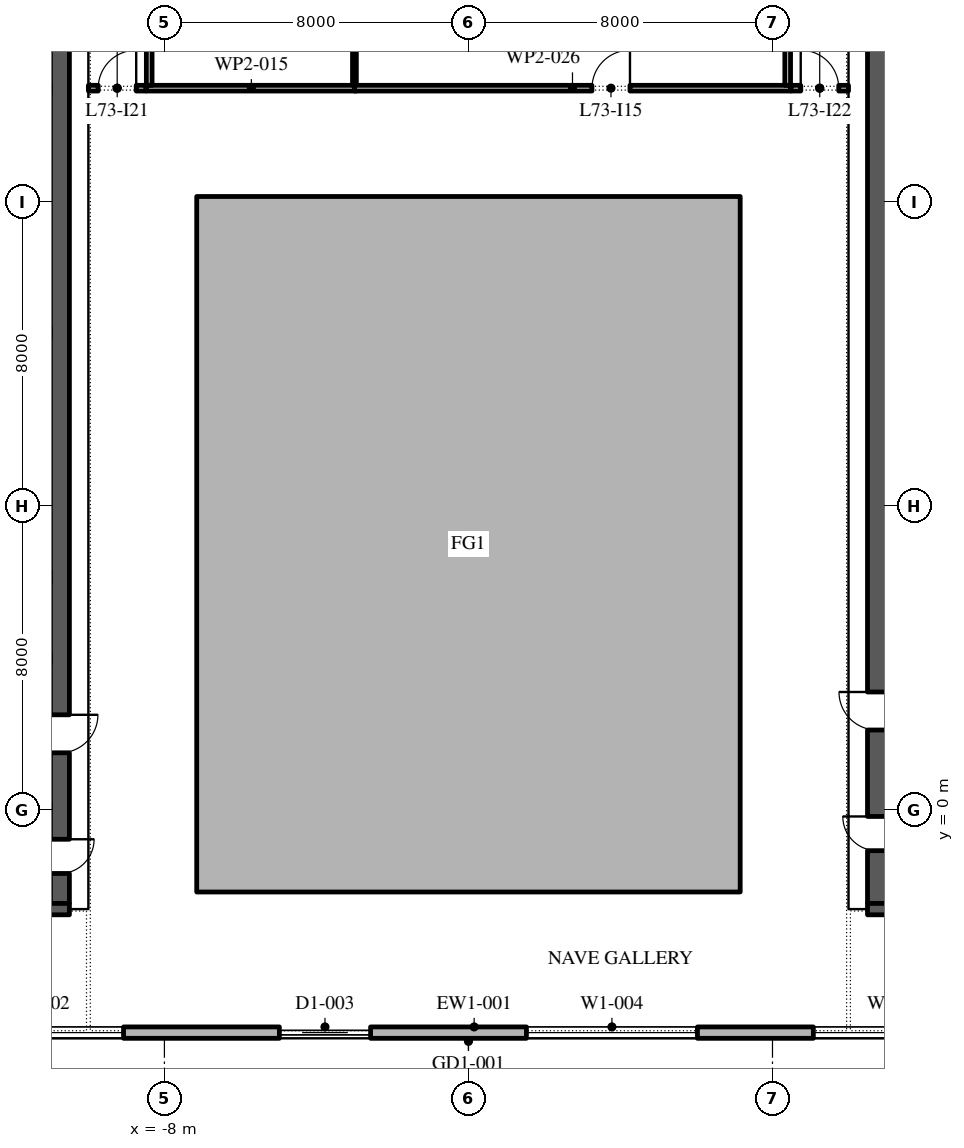
"""IFC4 building model, lengths in metres.
Left out: names, types, materials, properties, quantities, classifications, styles, units other than length and angle.
Written with IfcOpenShell. Run it as: python <this file> out.ifc"""

import sys

from ifc_helpers import new_model, si_unit, direction, frame, frame_2d, origin, place, context, subcontext, project, spatial, polyline, rectangle, outline, extrude, element, fill, save


model = new_model("IFC4")
c1 = context("Model", 3, precision=1e-05, world=origin(), true_north=direction((0.0, 1.0)))
c2 = subcontext(c1, "Body", "Model", "MODEL_VIEW")
j1 = project(units=[si_unit("LENGTHUNIT", "METRE"), si_unit("PLANEANGLEUNIT", "RADIAN")], contexts=[c1])
p1 = place(None, origin())
s1 = spatial("IfcSite", under=j1, at=p1, CompositionType="ELEMENT")
p2 = place(p1, origin())
s2 = spatial("IfcBuilding", under=s1, at=p2, CompositionType="ELEMENT")
p3 = place(p2, frame((0.0, 0.0, 334.2)))
s3 = spatial("IfcBuildingStorey", under=s2, at=p3, CompositionType="ELEMENT", Elevation=334.2)
p4 = place(p3, origin())
e1 = element("IfcWall", 1, at=p4, inside=s3, PredefinedType="STANDARD", context=c2, shape_type="SweptSolid", body=[
    extrude(outline(polyline([(-7.15, -2.15), (7.15, -2.15), (7.15, 16.15), (-7.15, 16.15), (-7.15, -2.15)]), holes=[polyline([(-7.0, -2.0), (-7.0, 16.0), (7.0, 16.0), (7.0, -2.0), (-7.0, -2.0)])]), origin(), (0.0, 0.0, 1.0), 4.0),
])
p5 = place(p3, frame((-22.35, -5.85, 0.0), z_axis=(0.0, 0.0, 1.0), x_axis=(1.0, 0.0, 0.0)))
e2 = element("IfcWall", 2, at=p5, inside=s3, PredefinedType="STANDARD", context=c2, shape_type="SweptSolid", body=[
    extrude(rectangle(XDim=45.0, YDim=0.3, at=frame_2d((22.5, 0.0))), origin(), (0.0, 0.0, 1.0), 4.0),
])
p6 = place(p5, frame((1.375, 0.0, 0.45)))
e3 = element("IfcOpeningElement", 3, at=p6, cuts=e2, PredefinedType="OPENING", context=c2, shape_type="SweptSolid", body=[
    extrude(rectangle(XDim=4.5, YDim=3.05, at=frame_2d((2.25, 1.525))), frame((0.0, 0.16, 0.0), z_axis=(0.0, -1.0, 0.0), x_axis=(1.0, 0.0, 0.0)), (0.0, 0.0, 1.0), 0.32),
])
p7 = place(p5, frame((8.775, 0.0, 0.45)))
e4 = element("IfcOpeningElement", 4, at=p7, cuts=e2, PredefinedType="OPENING", context=c2, shape_type="SweptSolid", body=[
    extrude(rectangle(XDim=4.5, YDim=3.05, at=frame_2d((2.25, 1.525))), frame((0.0, 0.16, 0.0), z_axis=(0.0, -1.0, 0.0), x_axis=(1.0, 0.0, 0.0)), (0.0, 0.0, 1.0), 0.32),
])
p8 = place(p5, frame((17.375, 0.0, 0.0)))
e5 = element("IfcOpeningElement", 5, at=p8, cuts=e2, PredefinedType="OPENING", context=c2, shape_type="SweptSolid", body=[
    extrude(rectangle(XDim=2.4, YDim=3.5, at=frame_2d((1.2, 1.75))), frame((0.0, 0.16, 0.0), z_axis=(0.0, -1.0, 0.0), x_axis=(1.0, 0.0, 0.0)), (0.0, 0.0, 1.0), 0.32),
])
p9 = place(p5, frame((23.875, 0.0, 0.45)))
e6 = element("IfcOpeningElement", 6, at=p9, cuts=e2, PredefinedType="OPENING", context=c2, shape_type="SweptSolid", body=[
    extrude(rectangle(XDim=4.5, YDim=3.05, at=frame_2d((2.25, 1.525))), frame((0.0, 0.16, 0.0), z_axis=(0.0, -1.0, 0.0), x_axis=(1.0, 0.0, 0.0)), (0.0, 0.0, 1.0), 0.32),
])
p10 = place(p5, frame((31.425, 0.0, 0.45)))
e7 = element("IfcOpeningElement", 7, at=p10, cuts=e2, PredefinedType="OPENING", context=c2, shape_type="SweptSolid", body=[
    extrude(rectangle(XDim=4.5, YDim=3.05, at=frame_2d((2.25, 1.525))), frame((0.0, 0.16, 0.0), z_axis=(0.0, -1.0, 0.0), x_axis=(1.0, 0.0, 0.0)), (0.0, 0.0, 1.0), 0.32),
])
p11 = place(p5, frame((38.975, 0.0, 0.45)))
e8 = element("IfcOpeningElement", 8, at=p11, cuts=e2, PredefinedType="OPENING", context=c2, shape_type="SweptSolid", body=[
    extrude(rectangle(XDim=4.5, YDim=3.05, at=frame_2d((2.25, 1.525))), frame((0.0, 0.16, 0.0), z_axis=(0.0, -1.0, 0.0), x_axis=(1.0, 0.0, 0.0)), (0.0, 0.0, 1.0), 0.32),
])
p12 = place(p3, frame((-10.75, -2.45, 0.0), z_axis=(0.0, 0.0, 1.0), x_axis=(0.0, 1.0, 0.0)))
e9 = element("IfcWall", 9, at=p12, inside=s3, PredefinedType="SHEAR", context=c2, shape_type="SweptSolid", body=[
    extrude(rectangle(XDim=27.9, YDim=0.5, at=frame_2d((13.95, 0.0))), origin(), (0.0, 0.0, 1.0), 4.0),
])
p13 = place(p12, frame((23.65, 0.0, 0.0)))
e10 = element("IfcOpeningElement", 10, at=p13, cuts=e9, PredefinedType="OPENING", context=c2, shape_type="SweptSolid", body=[
    extrude(rectangle(XDim=2.4, YDim=2.1, at=frame_2d((1.2, 1.05))), frame((0.0, 0.26, 0.0), z_axis=(0.0, -1.0, 0.0), x_axis=(1.0, 0.0, 0.0)), (0.0, 0.0, 1.0), 0.52),
])
p14 = place(p12, frame((0.788, 0.0, 0.0)))
e11 = element("IfcOpeningElement", 11, at=p14, cuts=e9, PredefinedType="OPENING", context=c2, shape_type="SweptSolid", body=[
    extrude(rectangle(XDim=0.9, YDim=2.1, at=frame_2d((0.45, 1.05))), frame((0.0, 0.26, 0.0), z_axis=(0.0, -1.0, 0.0), x_axis=(1.0, 0.0, 0.0)), (0.0, 0.0, 1.0), 0.52),
])
p15 = place(p12, frame((3.962, 0.0, 0.0)))
e12 = element("IfcOpeningElement", 12, at=p15, cuts=e9, PredefinedType="OPENING", context=c2, shape_type="SweptSolid", body=[
    extrude(rectangle(XDim=1.0, YDim=2.1, at=frame_2d((0.5, 1.05))), frame((0.0, 0.26, 0.0), z_axis=(0.0, -1.0, 0.0), x_axis=(1.0, 0.0, 0.0)), (0.0, 0.0, 1.0), 0.52),
])
p16 = place(p3, frame((-21.5, -2.6, 0.0), z_axis=(0.0, 0.0, 1.0), x_axis=(1.0, 0.0, 0.0)))
e13 = element("IfcWall", 13, at=p16, inside=s3, PredefinedType="SHEAR", context=c2, shape_type="SweptSolid", body=[
    extrude(rectangle(XDim=11.0, YDim=0.3, at=frame_2d((5.5, 0.0))), origin(), (0.0, 0.0, 1.0), 4.0),
])
p17 = place(p3, frame((10.75, -2.45, 0.0), z_axis=(0.0, 0.0, 1.0), x_axis=(0.0, 1.0, 0.0)))
e14 = element("IfcWall", 14, at=p17, inside=s3, PredefinedType="SHEAR", context=c2, shape_type="SweptSolid", body=[
    extrude(rectangle(XDim=27.9, YDim=0.5, at=frame_2d((13.95, 0.0))), origin(), (0.0, 0.0, 1.0), 4.0),
])
p18 = place(p17, frame((23.65, 0.0, 0.0)))
e15 = element("IfcOpeningElement", 15, at=p18, cuts=e14, PredefinedType="OPENING", context=c2, shape_type="SweptSolid", body=[
    extrude(rectangle(XDim=2.4, YDim=2.1, at=frame_2d((1.2, 1.05))), frame((0.0, 0.26, 0.0), z_axis=(0.0, -1.0, 0.0), x_axis=(1.0, 0.0, 0.0)), (0.0, 0.0, 1.0), 0.52),
])
p19 = place(p17, frame((1.387, 0.0, 0.0)))
e16 = element("IfcOpeningElement", 16, at=p19, cuts=e14, PredefinedType="OPENING", context=c2, shape_type="SweptSolid", body=[
    extrude(rectangle(XDim=0.9, YDim=2.1, at=frame_2d((0.45, 1.05))), frame((0.0, 0.26, 0.0), z_axis=(0.0, -1.0, 0.0), x_axis=(1.0, 0.0, 0.0)), (0.0, 0.0, 1.0), 0.52),
])
p20 = place(p17, frame((4.562, 0.0, 0.0)))
e17 = element("IfcOpeningElement", 17, at=p20, cuts=e14, PredefinedType="OPENING", context=c2, shape_type="SweptSolid", body=[
    extrude(rectangle(XDim=1.0, YDim=2.1, at=frame_2d((0.5, 1.05))), frame((0.0, 0.26, 0.0), z_axis=(0.0, -1.0, 0.0), x_axis=(1.0, 0.0, 0.0)), (0.0, 0.0, 1.0), 0.52),
])
p21 = place(p3, frame((10.5, -2.6, 0.0), z_axis=(0.0, 0.0, 1.0), x_axis=(1.0, 0.0, 0.0)))
e18 = element("IfcWall", 18, at=p21, inside=s3, PredefinedType="SHEAR", context=c2, shape_type="SweptSolid", body=[
    extrude(rectangle(XDim=11.0, YDim=0.3, at=frame_2d((5.5, 0.0))), origin(), (0.0, 0.0, 1.0), 4.0),
])
p22 = place(p3, frame((-8.475, 19.0, 0.0), z_axis=(0.0, 0.0, 1.0), x_axis=(1.0, 0.0, 0.0)))
e19 = element("IfcWall", 19, at=p22, inside=s3, PredefinedType="PARTITIONING", context=c2, shape_type="SweptSolid", body=[
    extrude(rectangle(XDim=5.525, YDim=0.15, at=frame_2d((2.763, 0.0))), origin(), (0.0, 0.0, 1.0), 4.0),
])
p23 = place(p3, frame((-8.4, 32.05, 0.0), z_axis=(0.0, 0.0, 1.0), x_axis=(0.0, -1.0, 0.0)))
e20 = element("IfcWall", 20, at=p23, inside=s3, PredefinedType="PARTITIONING", context=c2, shape_type="SweptSolid", body=[
    extrude(rectangle(XDim=12.975, YDim=0.15, at=frame_2d((6.488, 0.0))), origin(), (0.0, 0.0, 1.0), 4.0),
])
p24 = place(p23, frame((3.4, 0.0, 0.0)))
e21 = element("IfcOpeningElement", 21, at=p24, cuts=e20, PredefinedType="OPENING", context=c2, shape_type="SweptSolid", body=[
    extrude(rectangle(XDim=1.0, YDim=2.1, at=frame_2d((0.5, 1.05))), frame((0.0, 0.085, 0.0), z_axis=(0.0, -1.0, 0.0), x_axis=(1.0, 0.0, 0.0)), (0.0, 0.0, 1.0), 0.17),
])
p25 = place(p3, frame((-3.0, 19.075, 0.0), z_axis=(0.0, 0.0, 1.0), x_axis=(0.0, 1.0, 0.0)))
e22 = element("IfcWall", 22, at=p25, inside=s3, PredefinedType="PARTITIONING", context=c2, shape_type="SweptSolid", body=[
    extrude(rectangle(XDim=4.875, YDim=0.1, at=frame_2d((2.438, 0.0))), origin(), (0.0, 0.0, 1.0), 4.0),
])
p26 = place(p3, frame((-3.0, 19.0, 0.0), z_axis=(0.0, 0.0, 1.0), x_axis=(1.0, 0.0, 0.0)))
e23 = element("IfcWall", 23, at=p26, inside=s3, PredefinedType="PARTITIONING", context=c2, shape_type="SweptSolid", body=[
    extrude(rectangle(XDim=11.475, YDim=0.15, at=frame_2d((5.738, 0.0))), origin(), (0.0, 0.0, 1.0), 4.0),
])
p27 = place(p26, frame((6.25, 0.0, 0.0)))
e24 = element("IfcOpeningElement", 24, at=p27, cuts=e23, PredefinedType="OPENING", context=c2, shape_type="SweptSolid", body=[
    extrude(rectangle(XDim=1.0, YDim=2.1, at=frame_2d((0.5, 1.05))), frame((0.0, 0.085, 0.0), z_axis=(0.0, -1.0, 0.0), x_axis=(1.0, 0.0, 0.0)), (0.0, 0.0, 1.0), 0.17),
])
p28 = place(p3, frame((8.4, 19.075, 0.0), z_axis=(0.0, 0.0, 1.0), x_axis=(0.0, 1.0, 0.0)))
e25 = element("IfcWall", 25, at=p28, inside=s3, PredefinedType="PARTITIONING", context=c2, shape_type="SweptSolid", body=[
    extrude(rectangle(XDim=4.875, YDim=0.15, at=frame_2d((2.438, 0.0))), origin(), (0.0, 0.0, 1.0), 4.0),
])
p29 = place(p3, frame((-10.0, 19.0, 0.0), z_axis=(0.0, 0.0, 1.0), x_axis=(1.0, 0.0, 0.0)))
e26 = element("IfcWall", 26, at=p29, inside=s3, PredefinedType="PARTITIONING", context=c2, shape_type="SweptSolid", body=[
    extrude(rectangle(XDim=1.515, YDim=0.15, at=frame_2d((0.757, 0.0))), origin(), (0.0, 0.0, 1.0), 4.0),
])
p30 = place(p29, frame((0.258, 0.0, 0.0)))
e27 = element("IfcOpeningElement", 27, at=p30, cuts=e26, PredefinedType="OPENING", context=c2, shape_type="SweptSolid", body=[
    extrude(rectangle(XDim=1.0, YDim=2.1, at=frame_2d((0.5, 1.05))), frame((0.0, 0.085, 0.0), z_axis=(0.0, -1.0, 0.0), x_axis=(1.0, 0.0, 0.0)), (0.0, 0.0, 1.0), 0.17),
])
p31 = place(p3, frame((8.485, 19.0, 0.0), z_axis=(0.0, 0.0, 1.0), x_axis=(1.0, 0.0, 0.0)))
e28 = element("IfcWall", 28, at=p31, inside=s3, PredefinedType="PARTITIONING", context=c2, shape_type="SweptSolid", body=[
    extrude(rectangle(XDim=1.515, YDim=0.15, at=frame_2d((0.757, 0.0))), origin(), (0.0, 0.0, 1.0), 4.0),
])
p32 = place(p31, frame((0.258, 0.0, 0.0)))
e29 = element("IfcOpeningElement", 29, at=p32, cuts=e28, PredefinedType="OPENING", context=c2, shape_type="SweptSolid", body=[
    extrude(rectangle(XDim=1.0, YDim=2.1, at=frame_2d((0.5, 1.05))), frame((0.0, 0.085, 0.0), z_axis=(0.0, -1.0, 0.0), x_axis=(1.0, 0.0, 0.0)), (0.0, 0.0, 1.0), 0.17),
])
p33 = place(p7, origin())
e30 = element("IfcWindow", 30, at=p33, inside=s3, PartitioningType="DOUBLE_PANEL_VERTICAL", PredefinedType="WINDOW", context=c2, shape_type="SweptSolid", body=[
    extrude(rectangle(XDim=4.5, YDim=3.05, at=frame_2d((2.25, 1.525))), frame((0.0, 0.03, 0.0), z_axis=(0.0, -1.0, 0.0), x_axis=(1.0, 0.0, 0.0)), (0.0, 0.0, 1.0), 0.06),
])
fill(e4, e30)
p34 = place(p8, origin())
e31 = element("IfcDoor", 31, at=p34, inside=s3, OperationType="DOUBLE_DOOR_SLIDING", PredefinedType="DOOR", context=c2, shape_type="SweptSolid", body=[
    extrude(rectangle(XDim=2.4, YDim=3.5, at=frame_2d((1.2, 1.75))), frame((0.0, 0.025, 0.0), z_axis=(0.0, -1.0, 0.0), x_axis=(1.0, 0.0, 0.0)), (0.0, 0.0, 1.0), 0.05),
])
fill(e5, e31)
p35 = place(p9, origin())
e32 = element("IfcWindow", 32, at=p35, inside=s3, PartitioningType="DOUBLE_PANEL_VERTICAL", PredefinedType="WINDOW", context=c2, shape_type="SweptSolid", body=[
    extrude(rectangle(XDim=4.5, YDim=3.05, at=frame_2d((2.25, 1.525))), frame((0.0, 0.03, 0.0), z_axis=(0.0, -1.0, 0.0), x_axis=(1.0, 0.0, 0.0)), (0.0, 0.0, 1.0), 0.06),
])
fill(e6, e32)
p36 = place(p10, origin())
e33 = element("IfcWindow", 33, at=p36, inside=s3, PartitioningType="DOUBLE_PANEL_VERTICAL", PredefinedType="WINDOW", context=c2, shape_type="SweptSolid", body=[
    extrude(rectangle(XDim=4.5, YDim=3.05, at=frame_2d((2.25, 1.525))), frame((0.0, 0.03, 0.0), z_axis=(0.0, -1.0, 0.0), x_axis=(1.0, 0.0, 0.0)), (0.0, 0.0, 1.0), 0.06),
])
fill(e7, e33)
p37 = place(p27, origin())
e34 = element("IfcDoor", 34, at=p37, inside=s3, OperationType="SINGLE_SWING_LEFT", PredefinedType="DOOR", context=c2, shape_type="SweptSolid", body=[
    extrude(rectangle(XDim=1.0, YDim=2.1, at=frame_2d((0.5, 1.05))), frame((0.0, 0.025, 0.0), z_axis=(0.0, -1.0, 0.0), x_axis=(1.0, 0.0, 0.0)), (0.0, 0.0, 1.0), 0.05),
])
fill(e24, e34)
p38 = place(p30, origin())
e35 = element("IfcDoor", 35, at=p38, inside=s3, OperationType="SINGLE_SWING_LEFT", PredefinedType="DOOR", context=c2, shape_type="SweptSolid", body=[
    extrude(rectangle(XDim=1.0, YDim=2.1, at=frame_2d((0.5, 1.05))), frame((0.0, 0.025, 0.0), z_axis=(0.0, -1.0, 0.0), x_axis=(1.0, 0.0, 0.0)), (0.0, 0.0, 1.0), 0.05),
])
fill(e27, e35)
p39 = place(p32, origin())
e36 = element("IfcDoor", 36, at=p39, inside=s3, OperationType="SINGLE_SWING_RIGHT", PredefinedType="DOOR", context=c2, shape_type="SweptSolid", body=[
    extrude(rectangle(XDim=1.0, YDim=2.1, at=frame_2d((0.5, 1.05))), frame((0.0, 0.025, 0.0), z_axis=(0.0, -1.0, 0.0), x_axis=(1.0, 0.0, 0.0)), (0.0, 0.0, 1.0), 0.05),
])
fill(e29, e36)
save(model, sys.argv[1])
